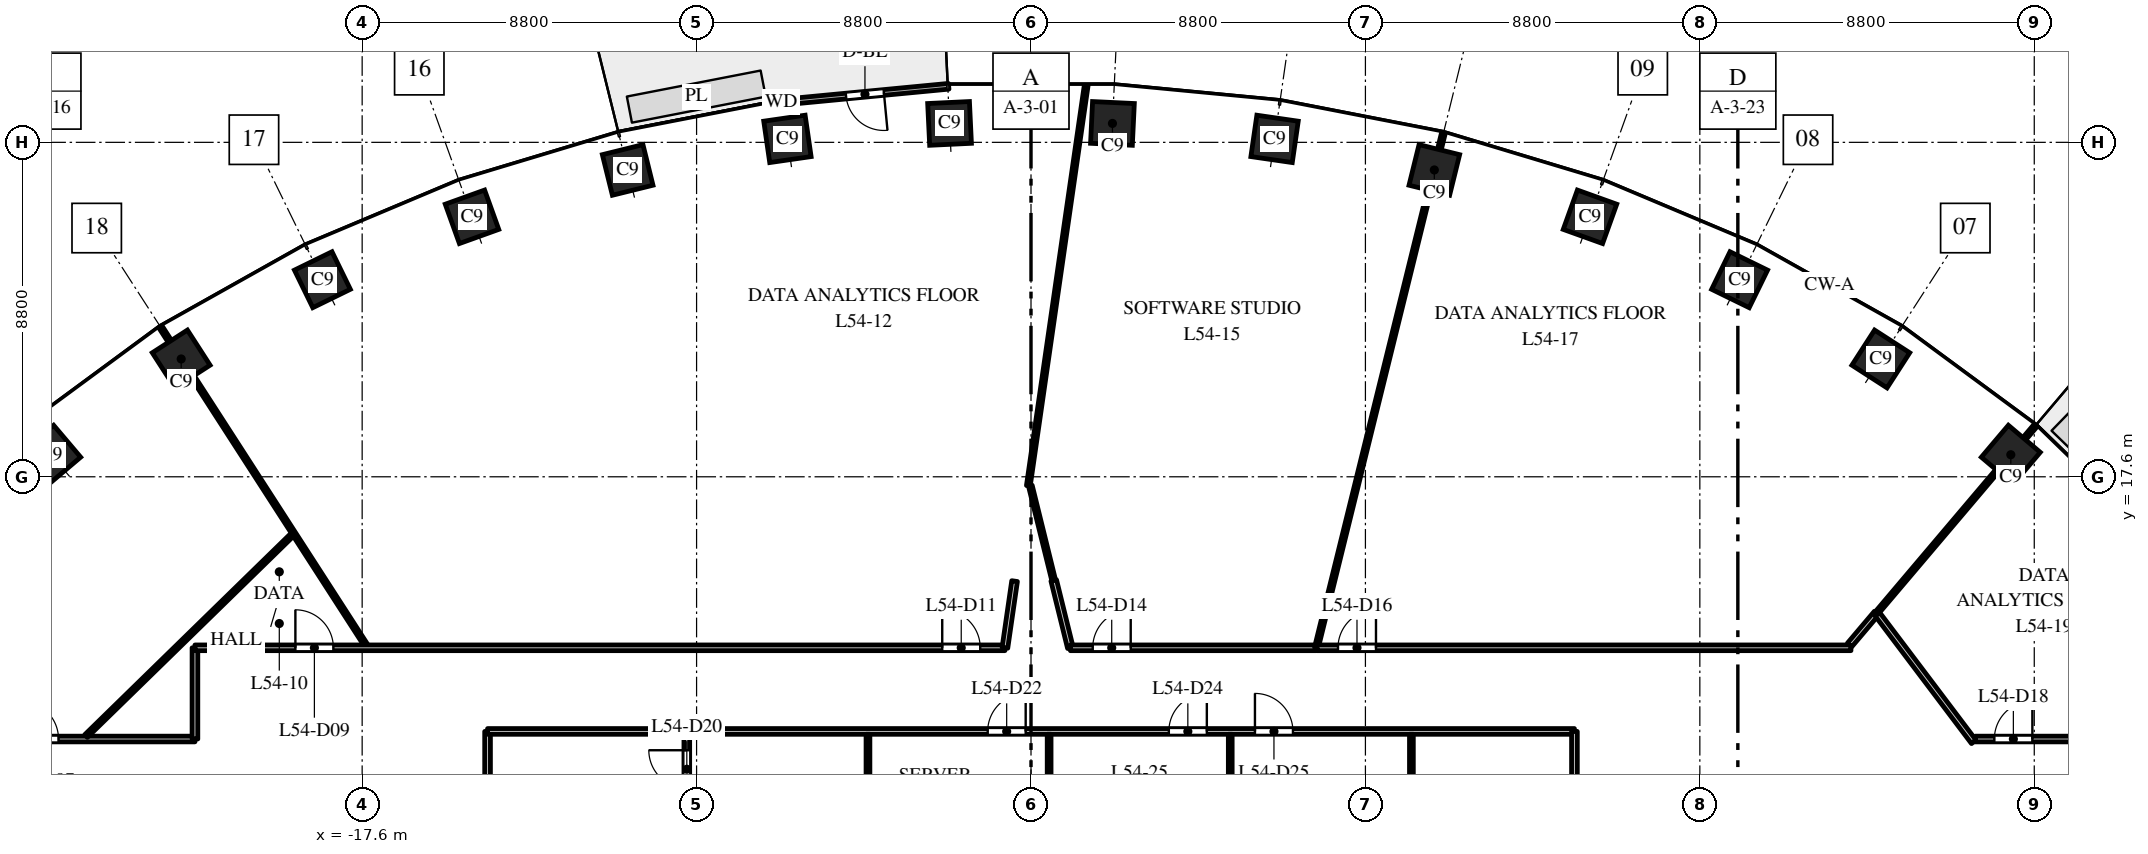
"""IFC4 building model, lengths in metres.
Left out: names, types, materials, properties, quantities, classifications, styles, units other than length and angle.
Written with IfcOpenShell. Run it as: python <this file> out.ifc"""

import sys

from ifc_helpers import new_model, si_unit, direction, frame, frame_2d, origin, origin_2d, place, context, subcontext, project, spatial, rectangle, extrude, element, fill, save


model = new_model("IFC4")
c1 = context("Model", 3, precision=1e-05, world=origin(), true_north=direction((0.0, 1.0)))
c2 = subcontext(c1, "Body", "Model", "MODEL_VIEW")
j1 = project(units=[si_unit("LENGTHUNIT", "METRE"), si_unit("PLANEANGLEUNIT", "RADIAN")], contexts=[c1])
p1 = place(None, origin())
s1 = spatial("IfcSite", under=j1, at=p1, CompositionType="ELEMENT")
p2 = place(p1, origin())
s2 = spatial("IfcBuilding", under=s1, at=p2, CompositionType="ELEMENT")
p3 = place(p2, frame((0.0, 0.0, 257.5)))
s3 = spatial("IfcBuildingStorey", under=s2, at=p3, CompositionType="ELEMENT", Elevation=257.5)
for number, where, z_axis, x_axis in (
    (1, (25.783, 18.18, 0.0), (0.0, 0.0, 1.0), (-0.763, 0.646, 0.0)),
    (2, (22.362, 20.7, 0.0), (0.0, 0.0, 1.0), (-0.84, 0.542, 0.0)),
    (3, (18.646, 22.785, 0.0), (0.0, 0.0, 1.0), (-0.898, 0.439, 0.0)),
    (4, (14.709, 24.441, 0.0), (0.0, 0.0, 1.0), (-0.941, 0.338, 0.0)),
    (5, (10.613, 25.674, 0.0), (0.0, 0.0, 1.0), (-0.971, 0.24, 0.0)),
    (6, (6.409, 26.491, 0.0), (0.0, 0.0, 1.0), (-0.99, 0.143, 0.0)),
    (7, (2.143, 26.898, 0.0), (0.0, 0.0, 1.0), (-0.999, 0.048, 0.0)),
    (8, (-2.143, 26.898, 0.0), (0.0, 0.0, 1.0), (-0.999, -0.048, 0.0)),
    (9, (-6.409, 26.491, 0.0), (0.0, 0.0, 1.0), (-0.99, -0.143, 0.0)),
    (10, (-10.613, 25.674, 0.0), (0.0, 0.0, 1.0), (-0.971, -0.24, 0.0)),
    (11, (-14.709, 24.441, 0.0), (0.0, 0.0, 1.0), (-0.941, -0.338, 0.0)),
    (12, (-18.646, 22.785, 0.0), (0.0, 0.0, 1.0), (-0.898, -0.439, 0.0)),
    (13, (-22.362, 20.7, 0.0), (0.0, 0.0, 1.0), (-0.84, -0.542, 0.0)),
    (14, (-25.783, 18.18, 0.0), (0.0, 0.0, 1.0), (-0.763, -0.646, 0.0)),
):
    element("IfcColumn", number, at=place(p3, frame(where, z_axis=z_axis, x_axis=x_axis)), inside=s3, PredefinedType="COLUMN", context=c2, shape_type="SweptSolid", body=[
        extrude(rectangle(XDim=1.1, YDim=1.1, at=origin_2d()), origin(), (0.0, 0.0, 1.0), 4.0),
    ])
p4 = place(p3, frame((-2.166, 27.875, 0.0), z_axis=(0.0, 0.0, 1.0), x_axis=(-0.995473879823, -0.095035543824, 0.0)))
e15 = element("IfcWall", 15, at=p4, inside=s3, PredefinedType="STANDARD", context=c2, shape_type="SweptSolid", body=[
    extrude(rectangle(XDim=4.426, YDim=0.15, at=frame_2d((2.213, 0.0))), origin(), (0.0, 0.0, 1.0), 3.7),
])
p5 = place(p4, frame((1.713, 0.0, 0.0)))
e16 = element("IfcOpeningElement", 16, at=p5, cuts=e15, PredefinedType="OPENING", context=c2, shape_type="SweptSolid", body=[
    extrude(rectangle(XDim=1.0, YDim=2.4, at=frame_2d((0.5, 1.2))), frame((0.0, 0.085, 0.0), z_axis=(0.0, -1.0, 0.0), x_axis=(1.0, 0.0, 0.0)), (0.0, 0.0, 1.0), 0.17),
])
p6 = place(p3, frame((-31.5, 10.7, 0.0), z_axis=(0.0, 0.0, 1.0), x_axis=(1.0, 0.0, 0.0)))
e17 = element("IfcWall", 17, at=p6, inside=s3, PredefinedType="PARTITIONING", context=c2, shape_type="SweptSolid", body=[
    extrude(rectangle(XDim=9.5, YDim=0.15, at=frame_2d((4.75, 0.0))), origin(), (0.0, 0.0, 1.0), 3.1),
])
p7 = place(p6, frame((4.91, 0.0, 0.0)))
e18 = element("IfcOpeningElement", 18, at=p7, cuts=e17, PredefinedType="OPENING", context=c2, shape_type="SweptSolid", body=[
    extrude(rectangle(XDim=1.0, YDim=2.1, at=frame_2d((0.5, 1.05))), frame((0.0, 0.085, 0.0), z_axis=(0.0, -1.0, 0.0), x_axis=(1.0, 0.0, 0.0)), (0.0, 0.0, 1.0), 0.17),
])
p8 = place(p3, frame((-24.866, 10.778, 0.0), z_axis=(0.0, 0.0, 1.0), x_axis=(0.715632814242, 0.698476681916, 0.0)))
e19 = element("IfcWall", 19, at=p8, inside=s3, PredefinedType="PARTITIONING", context=c2, shape_type="SweptSolid", body=[
    extrude(rectangle(XDim=7.585, YDim=0.1, at=frame_2d((3.792, 0.0))), origin(), (0.0, 0.0, 1.0), 2.75),
])
p9 = place(p3, frame((-22.905, 21.542, 0.0), z_axis=(0.0, 0.0, 1.0), x_axis=(0.542277075573, -0.840199722273, 0.0)))
e20 = element("IfcWall", 20, at=p9, inside=s3, PredefinedType="PARTITIONING", context=c2, shape_type="SweptSolid", body=[
    extrude(rectangle(XDim=9.958, YDim=0.1, at=frame_2d((4.979, 0.0))), origin(), (0.0, 0.0, 1.0), 3.0),
])
p10 = place(p3, frame((-22.0, 10.7, 0.0), z_axis=(0.0, 0.0, 1.0), x_axis=(0.0, 1.0, 0.0)))
e21 = element("IfcWall", 21, at=p10, inside=s3, PredefinedType="PARTITIONING", context=c2, shape_type="SweptSolid", body=[
    extrude(rectangle(XDim=2.4, YDim=0.15, at=frame_2d((1.2, 0.0))), origin(), (0.0, 0.0, 1.0), 3.7),
])
p11 = place(p3, frame((-22.0, 13.1, 0.0), z_axis=(0.0, 0.0, 1.0), x_axis=(1.0, 0.0, 0.0)))
e22 = element("IfcWall", 22, at=p11, inside=s3, PredefinedType="PARTITIONING", context=c2, shape_type="SweptSolid", body=[
    extrude(rectangle(XDim=21.314, YDim=0.15, at=frame_2d((10.657, 0.0))), origin(), (0.0, 0.0, 1.0), 2.75),
])
p12 = place(p11, frame((2.643, 0.0, 0.0)))
e23 = element("IfcOpeningElement", 23, at=p12, cuts=e22, PredefinedType="OPENING", context=c2, shape_type="SweptSolid", body=[
    extrude(rectangle(XDim=1.0, YDim=2.1, at=frame_2d((0.5, 1.05))), frame((0.0, 0.085, 0.0), z_axis=(0.0, -1.0, 0.0), x_axis=(1.0, 0.0, 0.0)), (0.0, 0.0, 1.0), 0.17),
])
p13 = place(p11, frame((19.664, 0.0, 0.0)))
e24 = element("IfcOpeningElement", 24, at=p13, cuts=e22, PredefinedType="OPENING", context=c2, shape_type="SweptSolid", body=[
    extrude(rectangle(XDim=1.0, YDim=2.1, at=frame_2d((0.5, 1.05))), frame((0.0, 0.085, 0.0), z_axis=(0.0, -1.0, 0.0), x_axis=(1.0, 0.0, 0.0)), (0.0, 0.0, 1.0), 0.17),
])
p14 = place(p3, frame((-14.3, -10.9, 0.0), z_axis=(0.0, 0.0, 1.0), x_axis=(0.0, 1.0, 0.0)))
e25 = element("IfcWall", 25, at=p14, inside=s3, PredefinedType="PARTITIONING", context=c2, shape_type="SweptSolid", body=[
    extrude(rectangle(XDim=21.8, YDim=0.15, at=frame_2d((10.9, 0.0))), origin(), (0.0, 0.0, 1.0), 2.75),
])
p15 = place(p14, frame((0.65, 0.0, 0.0)))
e26 = element("IfcOpeningElement", 26, at=p15, cuts=e25, PredefinedType="OPENING", context=c2, shape_type="SweptSolid", body=[
    extrude(rectangle(XDim=1.0, YDim=2.1, at=frame_2d((0.5, 1.05))), frame((0.0, 0.085, 0.0), z_axis=(0.0, -1.0, 0.0), x_axis=(1.0, 0.0, 0.0)), (0.0, 0.0, 1.0), 0.17),
])
p16 = place(p3, frame((-14.3, 10.9, 0.0), z_axis=(0.0, 0.0, 1.0), x_axis=(1.0, 0.0, 0.0)))
e27 = element("IfcWall", 27, at=p16, inside=s3, PredefinedType="PARTITIONING", context=c2, shape_type="SweptSolid", body=[
    extrude(rectangle(XDim=28.6, YDim=0.15, at=frame_2d((14.3, 0.0))), origin(), (0.0, 0.0, 1.0), 2.85),
])
p17 = place(p16, frame((13.16, 0.0, 0.0)))
e28 = element("IfcOpeningElement", 28, at=p17, cuts=e27, PredefinedType="OPENING", context=c2, shape_type="SweptSolid", body=[
    extrude(rectangle(XDim=1.0, YDim=2.1, at=frame_2d((0.5, 1.05))), frame((0.0, 0.085, 0.0), z_axis=(0.0, -1.0, 0.0), x_axis=(1.0, 0.0, 0.0)), (0.0, 0.0, 1.0), 0.17),
])
p18 = place(p16, frame((17.927, 0.0, 0.0)))
e29 = element("IfcOpeningElement", 29, at=p18, cuts=e27, PredefinedType="OPENING", context=c2, shape_type="SweptSolid", body=[
    extrude(rectangle(XDim=1.0, YDim=2.1, at=frame_2d((0.5, 1.05))), frame((0.0, 0.085, 0.0), z_axis=(0.0, -1.0, 0.0), x_axis=(1.0, 0.0, 0.0)), (0.0, 0.0, 1.0), 0.17),
])
p19 = place(p16, frame((20.193, 0.0, 0.0)))
e30 = element("IfcOpeningElement", 30, at=p19, cuts=e27, PredefinedType="OPENING", context=c2, shape_type="SweptSolid", body=[
    extrude(rectangle(XDim=1.0, YDim=2.1, at=frame_2d((0.5, 1.05))), frame((0.0, 0.085, 0.0), z_axis=(0.0, -1.0, 0.0), x_axis=(1.0, 0.0, 0.0)), (0.0, 0.0, 1.0), 0.17),
])
p20 = place(p3, frame((-9.057, 0.045, 0.0), z_axis=(0.0, 0.0, 1.0), x_axis=(0.0, 1.0, 0.0)))
e31 = element("IfcWall", 31, at=p20, inside=s3, PredefinedType="PARTITIONING", context=c2, shape_type="SweptSolid", body=[
    extrude(rectangle(XDim=10.78, YDim=0.15, at=frame_2d((5.39, 0.0))), origin(), (0.0, 0.0, 1.0), 2.75),
])
p21 = place(p20, frame((9.36, 0.0, 0.0)))
e32 = element("IfcOpeningElement", 32, at=p21, cuts=e31, PredefinedType="OPENING", context=c2, shape_type="SweptSolid", body=[
    extrude(rectangle(XDim=1.0, YDim=2.1, at=frame_2d((0.5, 1.05))), frame((0.0, 0.085, 0.0), z_axis=(0.0, -1.0, 0.0), x_axis=(1.0, 0.0, 0.0)), (0.0, 0.0, 1.0), 0.17),
])
p22 = place(p3, frame((-4.29, 6.568, 0.0), z_axis=(0.0, 0.0, 1.0), x_axis=(0.0, 1.0, 0.0)))
e33 = element("IfcWall", 33, at=p22, inside=s3, PredefinedType="PARTITIONING", context=c2, shape_type="SweptSolid", body=[
    extrude(rectangle(XDim=4.257, YDim=0.1, at=frame_2d((2.128, 0.0))), origin(), (0.0, 0.0, 1.0), 2.85),
])
p23 = place(p3, frame((-0.686, 13.1, 0.0), z_axis=(0.0, 0.0, 1.0), x_axis=(0.143329398439, 0.989675039366, 0.0)))
e34 = element("IfcWall", 34, at=p23, inside=s3, PredefinedType="PARTITIONING", context=c2, shape_type="SweptSolid", body=[
    extrude(rectangle(XDim=1.773, YDim=0.15, at=frame_2d((0.887, 0.0))), origin(), (0.0, 0.0, 1.0), 3.7),
])
p24 = place(p3, frame((-0.07, 17.364, 0.0), z_axis=(0.0, 0.0, 1.0), x_axis=(0.143049923822, 0.989715473909, 0.0)))
e35 = element("IfcWall", 35, at=p24, inside=s3, PredefinedType="PARTITIONING", context=c2, shape_type="SweptSolid", body=[
    extrude(rectangle(XDim=10.639, YDim=0.1, at=frame_2d((5.32, 0.0))), origin(), (0.0, 0.0, 1.0), 3.0),
])
p25 = place(p3, frame((-0.018, 17.367, 0.0), z_axis=(0.0, 0.0, 1.0), x_axis=(0.239726748723, -0.970840401893, 0.0)))
e36 = element("IfcWall", 36, at=p25, inside=s3, PredefinedType="PARTITIONING", context=c2, shape_type="SweptSolid", body=[
    extrude(rectangle(XDim=2.537, YDim=0.1, at=frame_2d((1.269, 0.0))), origin(), (0.0, 0.0, 1.0), 3.7),
])
p26 = place(p3, frame((0.477, 7.468, 0.0), z_axis=(0.0, 0.0, 1.0), x_axis=(0.0, 1.0, 0.0)))
e37 = element("IfcWall", 37, at=p26, inside=s3, PredefinedType="PARTITIONING", context=c2, shape_type="SweptSolid", body=[
    extrude(rectangle(XDim=3.357, YDim=0.1, at=frame_2d((1.678, 0.0))), origin(), (0.0, 0.0, 1.0), 3.0),
])
p27 = place(p3, frame((0.598, 14.874, 0.0), z_axis=(0.0, 0.0, 1.0), x_axis=(0.239705101821, -0.970845746842, 0.0)))
e38 = element("IfcWall", 38, at=p27, inside=s3, PredefinedType="PARTITIONING", context=c2, shape_type="SweptSolid", body=[
    extrude(rectangle(XDim=1.827, YDim=0.15, at=frame_2d((0.914, 0.0))), origin(), (0.0, 0.0, 1.0), 3.7),
])
p28 = place(p3, frame((1.036, 13.1, 0.0), z_axis=(0.0, 0.0, 1.0), x_axis=(1.0, 0.0, 0.0)))
e39 = element("IfcWall", 39, at=p28, inside=s3, PredefinedType="PARTITIONING", context=c2, shape_type="SweptSolid", body=[
    extrude(rectangle(XDim=6.471, YDim=0.15, at=frame_2d((3.236, 0.0))), origin(), (0.0, 0.0, 1.0), 2.85),
])
p29 = place(p28, frame((0.588, 0.0, 0.0)))
e40 = element("IfcOpeningElement", 40, at=p29, cuts=e39, PredefinedType="OPENING", context=c2, shape_type="SweptSolid", body=[
    extrude(rectangle(XDim=1.0, YDim=2.1, at=frame_2d((0.5, 1.05))), frame((0.0, 0.085, 0.0), z_axis=(0.0, -1.0, 0.0), x_axis=(1.0, 0.0, 0.0)), (0.0, 0.0, 1.0), 0.17),
])
p30 = place(p3, frame((5.243, 6.059, 0.0), z_axis=(0.0, 0.0, 1.0), x_axis=(0.0, 1.0, 0.0)))
e41 = element("IfcWall", 41, at=p30, inside=s3, PredefinedType="PARTITIONING", context=c2, shape_type="SweptSolid", body=[
    extrude(rectangle(XDim=4.766, YDim=0.1, at=frame_2d((2.383, 0.0))), origin(), (0.0, 0.0, 1.0), 2.85),
])
p31 = place(p3, frame((7.509, 13.1, 0.0), z_axis=(0.0, 0.0, 1.0), x_axis=(0.239669025128, 0.970854653588, 0.0)))
e42 = element("IfcWall", 42, at=p31, inside=s3, PredefinedType="PARTITIONING", context=c2, shape_type="SweptSolid", body=[
    extrude(rectangle(XDim=13.953, YDim=0.1, at=frame_2d((6.976, 0.0))), origin(), (0.0, 0.0, 1.0), 3.0),
])
p32 = place(p3, frame((7.524, 13.1, 0.0), z_axis=(0.0, 0.0, 1.0), x_axis=(1.0, 0.0, 0.0)))
e43 = element("IfcWall", 43, at=p32, inside=s3, PredefinedType="PARTITIONING", context=c2, shape_type="SweptSolid", body=[
    extrude(rectangle(XDim=14.052, YDim=0.15, at=frame_2d((7.026, 0.0))), origin(), (0.0, 0.0, 1.0), 2.85),
])
p33 = place(p32, frame((0.554, 0.0, 0.0)))
e44 = element("IfcOpeningElement", 44, at=p33, cuts=e43, PredefinedType="OPENING", context=c2, shape_type="SweptSolid", body=[
    extrude(rectangle(XDim=1.0, YDim=2.1, at=frame_2d((0.5, 1.05))), frame((0.0, 0.085, 0.0), z_axis=(0.0, -1.0, 0.0), x_axis=(1.0, 0.0, 0.0)), (0.0, 0.0, 1.0), 0.17),
])
p34 = place(p3, frame((10.01, -10.825, 0.0), z_axis=(0.0, 0.0, 1.0), x_axis=(0.0, 1.0, 0.0)))
e45 = element("IfcWall", 45, at=p34, inside=s3, PredefinedType="PARTITIONING", context=c2, shape_type="SweptSolid", body=[
    extrude(rectangle(XDim=21.65, YDim=0.1, at=frame_2d((10.825, 0.0))), origin(), (0.0, 0.0, 1.0), 2.75),
])
p35 = place(p3, frame((14.3, -10.9, 0.0), z_axis=(0.0, 0.0, 1.0), x_axis=(0.0, 1.0, 0.0)))
e46 = element("IfcWall", 46, at=p35, inside=s3, PredefinedType="PARTITIONING", context=c2, shape_type="SweptSolid", body=[
    extrude(rectangle(XDim=21.8, YDim=0.15, at=frame_2d((10.9, 0.0))), origin(), (0.0, 0.0, 1.0), 2.75),
])
p36 = place(p35, frame((0.65, 0.0, 0.0)))
e47 = element("IfcOpeningElement", 47, at=p36, cuts=e46, PredefinedType="OPENING", context=c2, shape_type="SweptSolid", body=[
    extrude(rectangle(XDim=1.0, YDim=2.1, at=frame_2d((0.5, 1.05))), frame((0.0, 0.085, 0.0), z_axis=(0.0, -1.0, 0.0), x_axis=(1.0, 0.0, 0.0)), (0.0, 0.0, 1.0), 0.17),
])
p37 = place(p3, frame((21.541, 13.175, 0.0), z_axis=(0.0, 0.0, 1.0), x_axis=(0.646460291141, 0.762947633837, 0.0)))
e48 = element("IfcWall", 48, at=p37, inside=s3, PredefinedType="PARTITIONING", context=c2, shape_type="SweptSolid", body=[
    extrude(rectangle(XDim=1.098, YDim=0.15, at=frame_2d((0.549, 0.0))), origin(), (0.0, 0.0, 1.0), 3.7),
])
p38 = place(p3, frame((22.251, 14.013, 0.0), z_axis=(0.0, 0.0, 1.0), x_axis=(0.602435944628, -0.798167233492, 0.0)))
e49 = element("IfcWall", 49, at=p38, inside=s3, PredefinedType="PARTITIONING", context=c2, shape_type="SweptSolid", body=[
    extrude(rectangle(XDim=4.245, YDim=0.15, at=frame_2d((2.122, 0.0))), origin(), (0.0, 0.0, 1.0), 2.75),
])
p39 = place(p3, frame((22.251, 14.013, 0.0), z_axis=(0.0, 0.0, 1.0), x_axis=(0.646448300096, 0.76295779392, 0.0)))
e50 = element("IfcWall", 50, at=p39, inside=s3, PredefinedType="PARTITIONING", context=c2, shape_type="SweptSolid", body=[
    extrude(rectangle(XDim=6.465, YDim=0.1, at=frame_2d((3.232, 0.0))), origin(), (0.0, 0.0, 1.0), 3.0),
])
p40 = place(p3, frame((24.845, 10.7, 0.0), z_axis=(0.0, 0.0, 1.0), x_axis=(1.0, 0.0, 0.0)))
e51 = element("IfcWall", 51, at=p40, inside=s3, PredefinedType="PARTITIONING", context=c2, shape_type="SweptSolid", body=[
    extrude(rectangle(XDim=6.655, YDim=0.15, at=frame_2d((3.328, 0.0))), origin(), (0.0, 0.0, 1.0), 3.0),
])
p41 = place(p40, frame((0.505, 0.0, 0.0)))
e52 = element("IfcOpeningElement", 52, at=p41, cuts=e51, PredefinedType="OPENING", context=c2, shape_type="SweptSolid", body=[
    extrude(rectangle(XDim=1.0, YDim=2.1, at=frame_2d((0.5, 1.05))), frame((0.0, 0.085, 0.0), z_axis=(0.0, -1.0, 0.0), x_axis=(1.0, 0.0, 0.0)), (0.0, 0.0, 1.0), 0.17),
])
p42 = place(p5, origin())
e53 = element("IfcDoor", 53, at=p42, inside=s3, OperationType="SINGLE_SWING_LEFT", PredefinedType="DOOR", context=c2, shape_type="SweptSolid", body=[
    extrude(rectangle(XDim=1.0, YDim=2.4, at=frame_2d((0.5, 1.2))), frame((0.0, 0.025, 0.0), z_axis=(0.0, -1.0, 0.0), x_axis=(1.0, 0.0, 0.0)), (0.0, 0.0, 1.0), 0.05),
])
fill(e16, e53)
p43 = place(p7, origin())
e54 = element("IfcDoor", 54, at=p43, inside=s3, OperationType="SINGLE_SWING_LEFT", PredefinedType="DOOR", context=c2, shape_type="SweptSolid", body=[
    extrude(rectangle(XDim=1.0, YDim=2.1, at=frame_2d((0.5, 1.05))), frame((0.0, 0.025, 0.0), z_axis=(0.0, -1.0, 0.0), x_axis=(1.0, 0.0, 0.0)), (0.0, 0.0, 1.0), 0.05),
])
fill(e18, e54)
p44 = place(p12, origin())
e55 = element("IfcDoor", 55, at=p44, inside=s3, OperationType="SINGLE_SWING_LEFT", PredefinedType="DOOR", context=c2, shape_type="SweptSolid", body=[
    extrude(rectangle(XDim=1.0, YDim=2.1, at=frame_2d((0.5, 1.05))), frame((0.0, 0.025, 0.0), z_axis=(0.0, -1.0, 0.0), x_axis=(1.0, 0.0, 0.0)), (0.0, 0.0, 1.0), 0.05),
])
fill(e23, e55)
p45 = place(p13, origin())
e56 = element("IfcDoor", 56, at=p45, inside=s3, OperationType="SINGLE_SWING_LEFT", PredefinedType="DOOR", context=c2, shape_type="SweptSolid", body=[
    extrude(rectangle(XDim=1.0, YDim=2.1, at=frame_2d((0.5, 1.05))), frame((0.0, 0.025, 0.0), z_axis=(0.0, -1.0, 0.0), x_axis=(1.0, 0.0, 0.0)), (0.0, 0.0, 1.0), 0.05),
])
fill(e24, e56)
p46 = place(p29, origin())
e57 = element("IfcDoor", 57, at=p46, inside=s3, OperationType="SINGLE_SWING_RIGHT", PredefinedType="DOOR", context=c2, shape_type="SweptSolid", body=[
    extrude(rectangle(XDim=1.0, YDim=2.1, at=frame_2d((0.5, 1.05))), frame((0.0, 0.025, 0.0), z_axis=(0.0, -1.0, 0.0), x_axis=(1.0, 0.0, 0.0)), (0.0, 0.0, 1.0), 0.05),
])
fill(e40, e57)
p47 = place(p33, origin())
e58 = element("IfcDoor", 58, at=p47, inside=s3, OperationType="SINGLE_SWING_RIGHT", PredefinedType="DOOR", context=c2, shape_type="SweptSolid", body=[
    extrude(rectangle(XDim=1.0, YDim=2.1, at=frame_2d((0.5, 1.05))), frame((0.0, 0.025, 0.0), z_axis=(0.0, -1.0, 0.0), x_axis=(1.0, 0.0, 0.0)), (0.0, 0.0, 1.0), 0.05),
])
fill(e44, e58)
p48 = place(p41, origin())
e59 = element("IfcDoor", 59, at=p48, inside=s3, OperationType="SINGLE_SWING_RIGHT", PredefinedType="DOOR", context=c2, shape_type="SweptSolid", body=[
    extrude(rectangle(XDim=1.0, YDim=2.1, at=frame_2d((0.5, 1.05))), frame((0.0, 0.025, 0.0), z_axis=(0.0, -1.0, 0.0), x_axis=(1.0, 0.0, 0.0)), (0.0, 0.0, 1.0), 0.05),
])
fill(e52, e59)
p49 = place(p21, origin())
e60 = element("IfcDoor", 60, at=p49, inside=s3, OperationType="SINGLE_SWING_RIGHT", PredefinedType="DOOR", context=c2, shape_type="SweptSolid", body=[
    extrude(rectangle(XDim=1.0, YDim=2.1, at=frame_2d((0.5, 1.05))), frame((0.0, 0.025, 0.0), z_axis=(0.0, -1.0, 0.0), x_axis=(1.0, 0.0, 0.0)), (0.0, 0.0, 1.0), 0.05),
])
fill(e32, e60)
p50 = place(p17, origin())
e61 = element("IfcDoor", 61, at=p50, inside=s3, OperationType="SINGLE_SWING_RIGHT", PredefinedType="DOOR", context=c2, shape_type="SweptSolid", body=[
    extrude(rectangle(XDim=1.0, YDim=2.1, at=frame_2d((0.5, 1.05))), frame((0.0, 0.025, 0.0), z_axis=(0.0, -1.0, 0.0), x_axis=(1.0, 0.0, 0.0)), (0.0, 0.0, 1.0), 0.05),
])
fill(e28, e61)
p51 = place(p18, origin())
e62 = element("IfcDoor", 62, at=p51, inside=s3, OperationType="SINGLE_SWING_RIGHT", PredefinedType="DOOR", context=c2, shape_type="SweptSolid", body=[
    extrude(rectangle(XDim=1.0, YDim=2.1, at=frame_2d((0.5, 1.05))), frame((0.0, 0.025, 0.0), z_axis=(0.0, -1.0, 0.0), x_axis=(1.0, 0.0, 0.0)), (0.0, 0.0, 1.0), 0.05),
])
fill(e29, e62)
p52 = place(p19, origin())
e63 = element("IfcDoor", 63, at=p52, inside=s3, OperationType="SINGLE_SWING_LEFT", PredefinedType="DOOR", context=c2, shape_type="SweptSolid", body=[
    extrude(rectangle(XDim=1.0, YDim=2.1, at=frame_2d((0.5, 1.05))), frame((0.0, 0.025, 0.0), z_axis=(0.0, -1.0, 0.0), x_axis=(1.0, 0.0, 0.0)), (0.0, 0.0, 1.0), 0.05),
])
fill(e30, e63)
save(model, sys.argv[1])
